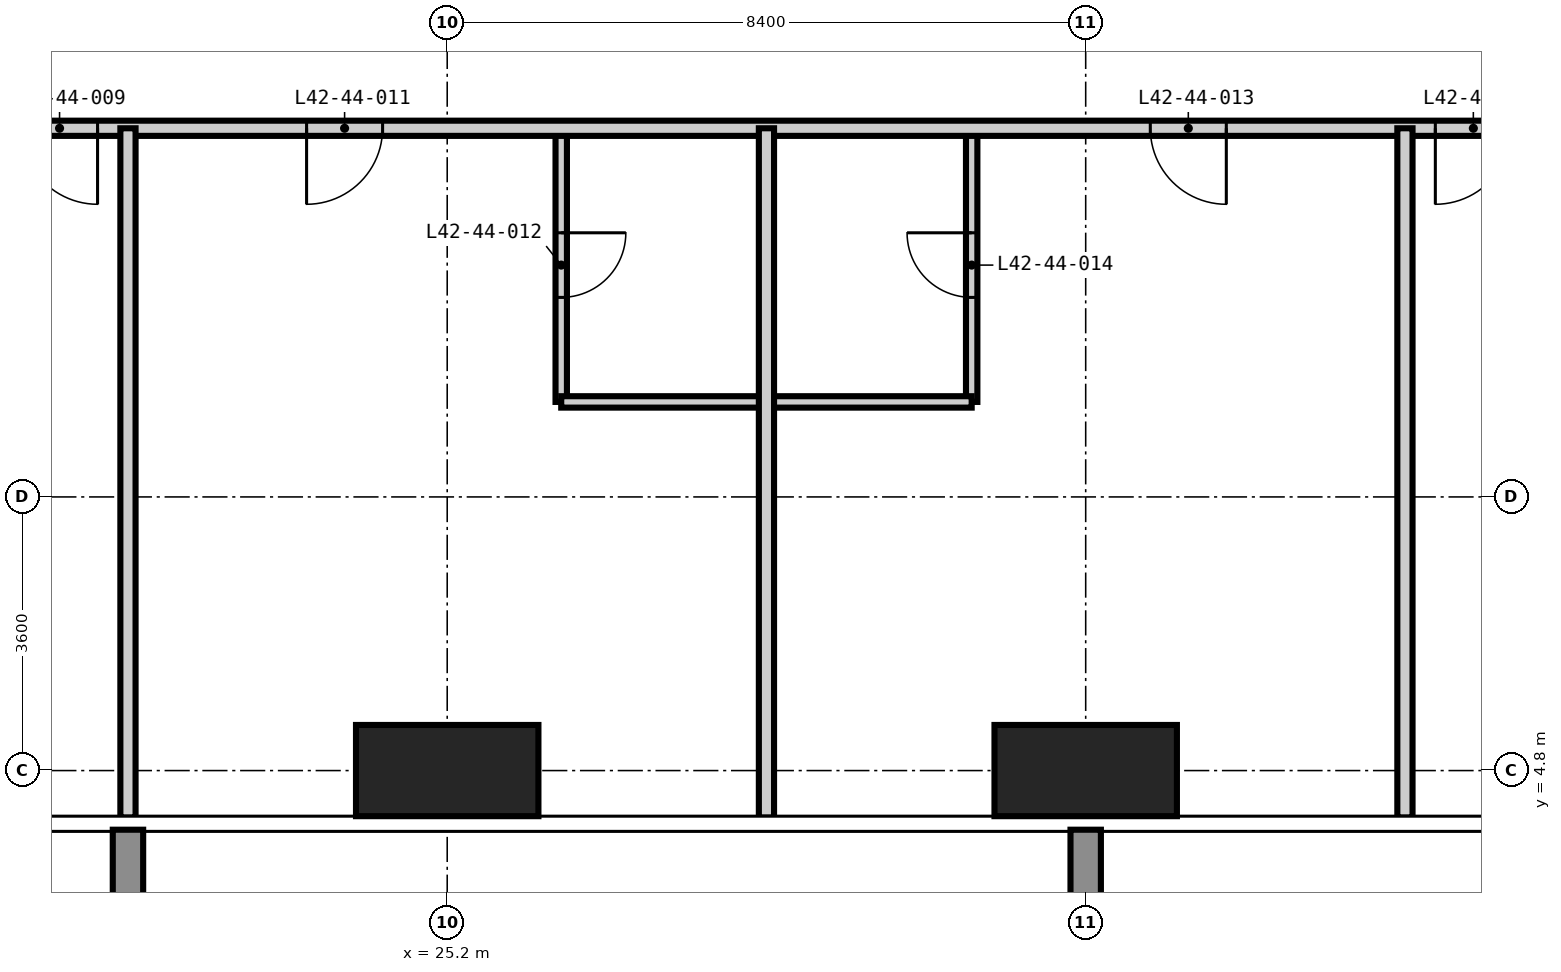
"""IFC4 building model, lengths in metres.
Left out: names, types, materials, properties, quantities, classifications, styles, units other than length and angle.
Written with IfcOpenShell. Run it as: python <this file> out.ifc"""

import sys

from ifc_helpers import new_model, si_unit, direction, frame, frame_2d, origin, origin_2d, place, context, subcontext, project, spatial, rectangle, extrude, element, fill, save


model = new_model("IFC4")
c1 = context("Model", 3, precision=1e-05, world=origin(), true_north=direction((0.0, 1.0)))
c2 = subcontext(c1, "Body", "Model", "MODEL_VIEW")
j1 = project(units=[si_unit("LENGTHUNIT", "METRE"), si_unit("PLANEANGLEUNIT", "RADIAN")], contexts=[c1])
p1 = place(None, origin())
s1 = spatial("IfcSite", under=j1, at=p1, CompositionType="ELEMENT")
p2 = place(p1, origin())
s2 = spatial("IfcBuilding", under=s1, at=p2, CompositionType="ELEMENT")
p3 = place(p2, frame((0.0, 0.0, 166.2)))
s3 = spatial("IfcBuildingStorey", under=s2, at=p3, CompositionType="ELEMENT", Elevation=166.2)
for number, where, z_axis, x_axis in (
    (1, (25.2, 4.8, -0.35), (0.0, 0.0, 1.0), (1.0, 0.0, 0.0)),
    (2, (33.6, 4.8, -0.35), (0.0, 0.0, 1.0), (1.0, 0.0, 0.0)),
):
    element("IfcColumn", number, at=place(p3, frame(where, z_axis=z_axis, x_axis=x_axis)), inside=s3, PredefinedType="COLUMN", context=c2, shape_type="SweptSolid", body=[
        extrude(rectangle(XDim=2.4, YDim=1.2, at=origin_2d()), origin(), (0.0, 0.0, 1.0), 3.6),
    ])
p4 = place(p3, frame((26.7, 9.65, 0.0), z_axis=(0.0, 0.0, 1.0), x_axis=(0.0, 1.0, 0.0)))
e3 = element("IfcWall", 3, at=p4, inside=s3, PredefinedType="PARTITIONING", context=c2, shape_type="SweptSolid", body=[
    extrude(rectangle(XDim=3.6, YDim=0.15, at=frame_2d((1.8, 0.0))), origin(), (0.0, 0.0, 1.0), 3.25),
])
p5 = place(p4, frame((1.375, 0.0, 0.0)))
e4 = element("IfcOpeningElement", 4, at=p5, cuts=e3, PredefinedType="OPENING", context=c2, shape_type="SweptSolid", body=[
    extrude(rectangle(XDim=0.85, YDim=2.1, at=frame_2d((0.425, 1.05))), frame((0.0, 0.085, 0.0), z_axis=(0.0, -1.0, 0.0), x_axis=(1.0, 0.0, 0.0)), (0.0, 0.0, 1.0), 0.17),
])
p6 = place(p3, frame((32.1, 9.65, 0.0), z_axis=(0.0, 0.0, 1.0), x_axis=(0.0, 1.0, 0.0)))
e5 = element("IfcWall", 5, at=p6, inside=s3, PredefinedType="PARTITIONING", context=c2, shape_type="SweptSolid", body=[
    extrude(rectangle(XDim=3.6, YDim=0.15, at=frame_2d((1.8, 0.0))), origin(), (0.0, 0.0, 1.0), 3.25),
])
p7 = place(p6, frame((1.375, 0.0, 0.0)))
e6 = element("IfcOpeningElement", 6, at=p7, cuts=e5, PredefinedType="OPENING", context=c2, shape_type="SweptSolid", body=[
    extrude(rectangle(XDim=0.85, YDim=2.1, at=frame_2d((0.425, 1.05))), frame((0.0, 0.085, 0.0), z_axis=(0.0, -1.0, 0.0), x_axis=(1.0, 0.0, 0.0)), (0.0, 0.0, 1.0), 0.17),
])
p8 = place(p3, frame((26.7, 9.65, 0.0), z_axis=(0.0, 0.0, 1.0), x_axis=(1.0, 0.0, 0.0)))
e7 = element("IfcWall", 7, at=p8, inside=s3, PredefinedType="PARTITIONING", context=c2, shape_type="SweptSolid", body=[
    extrude(rectangle(XDim=5.4, YDim=0.15, at=frame_2d((2.7, 0.0))), origin(), (0.0, 0.0, 1.0), 3.25),
])
p9 = place(p3, frame((44.35, 13.25, 0.0), z_axis=(0.0, 0.0, 1.0), x_axis=(-1.0, 0.0, 0.0)))
e8 = element("IfcWall", 8, at=p9, inside=s3, PredefinedType="PARTITIONING", context=c2, shape_type="SweptSolid", body=[
    extrude(rectangle(XDim=31.1, YDim=0.2, at=frame_2d((15.55, 0.0))), origin(), (0.0, 0.0, 1.0), 3.25),
])
p10 = place(p9, frame((23.75, 0.0, 0.0)))
e9 = element("IfcOpeningElement", 9, at=p10, cuts=e8, PredefinedType="OPENING", context=c2, shape_type="SweptSolid", body=[
    extrude(rectangle(XDim=1.0, YDim=2.2, at=frame_2d((0.5, 1.1))), frame((0.0, 0.11, 0.0), z_axis=(0.0, -1.0, 0.0), x_axis=(1.0, 0.0, 0.0)), (0.0, 0.0, 1.0), 0.22),
])
p11 = place(p9, frame((20.0, 0.0, 0.0)))
e10 = element("IfcOpeningElement", 10, at=p11, cuts=e8, PredefinedType="OPENING", context=c2, shape_type="SweptSolid", body=[
    extrude(rectangle(XDim=1.0, YDim=2.2, at=frame_2d((0.5, 1.1))), frame((0.0, 0.11, 0.0), z_axis=(0.0, -1.0, 0.0), x_axis=(1.0, 0.0, 0.0)), (0.0, 0.0, 1.0), 0.22),
])
p12 = place(p9, frame((8.9, 0.0, 0.0)))
e11 = element("IfcOpeningElement", 11, at=p12, cuts=e8, PredefinedType="OPENING", context=c2, shape_type="SweptSolid", body=[
    extrude(rectangle(XDim=1.0, YDim=2.2, at=frame_2d((0.5, 1.1))), frame((0.0, 0.11, 0.0), z_axis=(0.0, -1.0, 0.0), x_axis=(1.0, 0.0, 0.0)), (0.0, 0.0, 1.0), 0.22),
])
p13 = place(p9, frame((5.15, 0.0, 0.0)))
e12 = element("IfcOpeningElement", 12, at=p13, cuts=e8, PredefinedType="OPENING", context=c2, shape_type="SweptSolid", body=[
    extrude(rectangle(XDim=1.0, YDim=2.2, at=frame_2d((0.5, 1.1))), frame((0.0, 0.11, 0.0), z_axis=(0.0, -1.0, 0.0), x_axis=(1.0, 0.0, 0.0)), (0.0, 0.0, 1.0), 0.22),
])
for number, where, z_axis, x_axis in (
    (13, (21.0, 4.182, 0.0), (0.0, 0.0, 1.0), (0.0, 1.0, 0.0)),
    (14, (29.4, 4.182, 0.0), (0.0, 0.0, 1.0), (0.0, 1.0, 0.0)),
    (15, (37.8, 4.182, 0.0), (0.0, 0.0, 1.0), (0.0, 1.0, 0.0)),
):
    element("IfcWall", number, at=place(p3, frame(where, z_axis=z_axis, x_axis=x_axis)), inside=s3, PredefinedType="PARTITIONING", context=c2, shape_type="SweptSolid", body=[
        extrude(rectangle(XDim=9.068, YDim=0.2, at=frame_2d((4.534, 0.0))), origin(), (0.0, 0.0, 1.0), 3.25),
    ])
p14 = place(p10, origin())
e16 = element("IfcDoor", 16, at=p14, inside=s3, OperationType="SINGLE_SWING_LEFT", PredefinedType="DOOR", context=c2, shape_type="SweptSolid", body=[
    extrude(rectangle(XDim=1.0, YDim=2.2, at=frame_2d((0.5, 1.1))), frame((0.0, 0.025, 0.0), z_axis=(0.0, -1.0, 0.0), x_axis=(1.0, 0.0, 0.0)), (0.0, 0.0, 1.0), 0.05),
])
fill(e9, e16)
p15 = place(p11, origin())
e17 = element("IfcDoor", 17, at=p15, inside=s3, OperationType="SINGLE_SWING_RIGHT", PredefinedType="DOOR", context=c2, shape_type="SweptSolid", body=[
    extrude(rectangle(XDim=1.0, YDim=2.2, at=frame_2d((0.5, 1.1))), frame((0.0, 0.025, 0.0), z_axis=(0.0, -1.0, 0.0), x_axis=(1.0, 0.0, 0.0)), (0.0, 0.0, 1.0), 0.05),
])
fill(e10, e17)
p16 = place(p5, frame((0.85, 0.0, 0.0), z_axis=(0.0, 0.0, 1.0), x_axis=(-1.0, 0.0, 0.0)))
e18 = element("IfcDoor", 18, at=p16, inside=s3, OperationType="SINGLE_SWING_LEFT", PredefinedType="DOOR", context=c2, shape_type="SweptSolid", body=[
    extrude(rectangle(XDim=0.85, YDim=2.1, at=frame_2d((0.425, 1.05))), frame((0.0, 0.025, 0.0), z_axis=(0.0, -1.0, 0.0), x_axis=(1.0, 0.0, 0.0)), (0.0, 0.0, 1.0), 0.05),
])
fill(e4, e18)
p17 = place(p12, origin())
e19 = element("IfcDoor", 19, at=p17, inside=s3, OperationType="SINGLE_SWING_LEFT", PredefinedType="DOOR", context=c2, shape_type="SweptSolid", body=[
    extrude(rectangle(XDim=1.0, YDim=2.2, at=frame_2d((0.5, 1.1))), frame((0.0, 0.025, 0.0), z_axis=(0.0, -1.0, 0.0), x_axis=(1.0, 0.0, 0.0)), (0.0, 0.0, 1.0), 0.05),
])
fill(e11, e19)
p18 = place(p7, origin())
e20 = element("IfcDoor", 20, at=p18, inside=s3, OperationType="SINGLE_SWING_RIGHT", PredefinedType="DOOR", context=c2, shape_type="SweptSolid", body=[
    extrude(rectangle(XDim=0.85, YDim=2.1, at=frame_2d((0.425, 1.05))), frame((0.0, 0.025, 0.0), z_axis=(0.0, -1.0, 0.0), x_axis=(1.0, 0.0, 0.0)), (0.0, 0.0, 1.0), 0.05),
])
fill(e6, e20)
p19 = place(p13, origin())
e21 = element("IfcDoor", 21, at=p19, inside=s3, OperationType="SINGLE_SWING_RIGHT", PredefinedType="DOOR", context=c2, shape_type="SweptSolid", body=[
    extrude(rectangle(XDim=1.0, YDim=2.2, at=frame_2d((0.5, 1.1))), frame((0.0, 0.025, 0.0), z_axis=(0.0, -1.0, 0.0), x_axis=(1.0, 0.0, 0.0)), (0.0, 0.0, 1.0), 0.05),
])
fill(e12, e21)
save(model, sys.argv[1])
